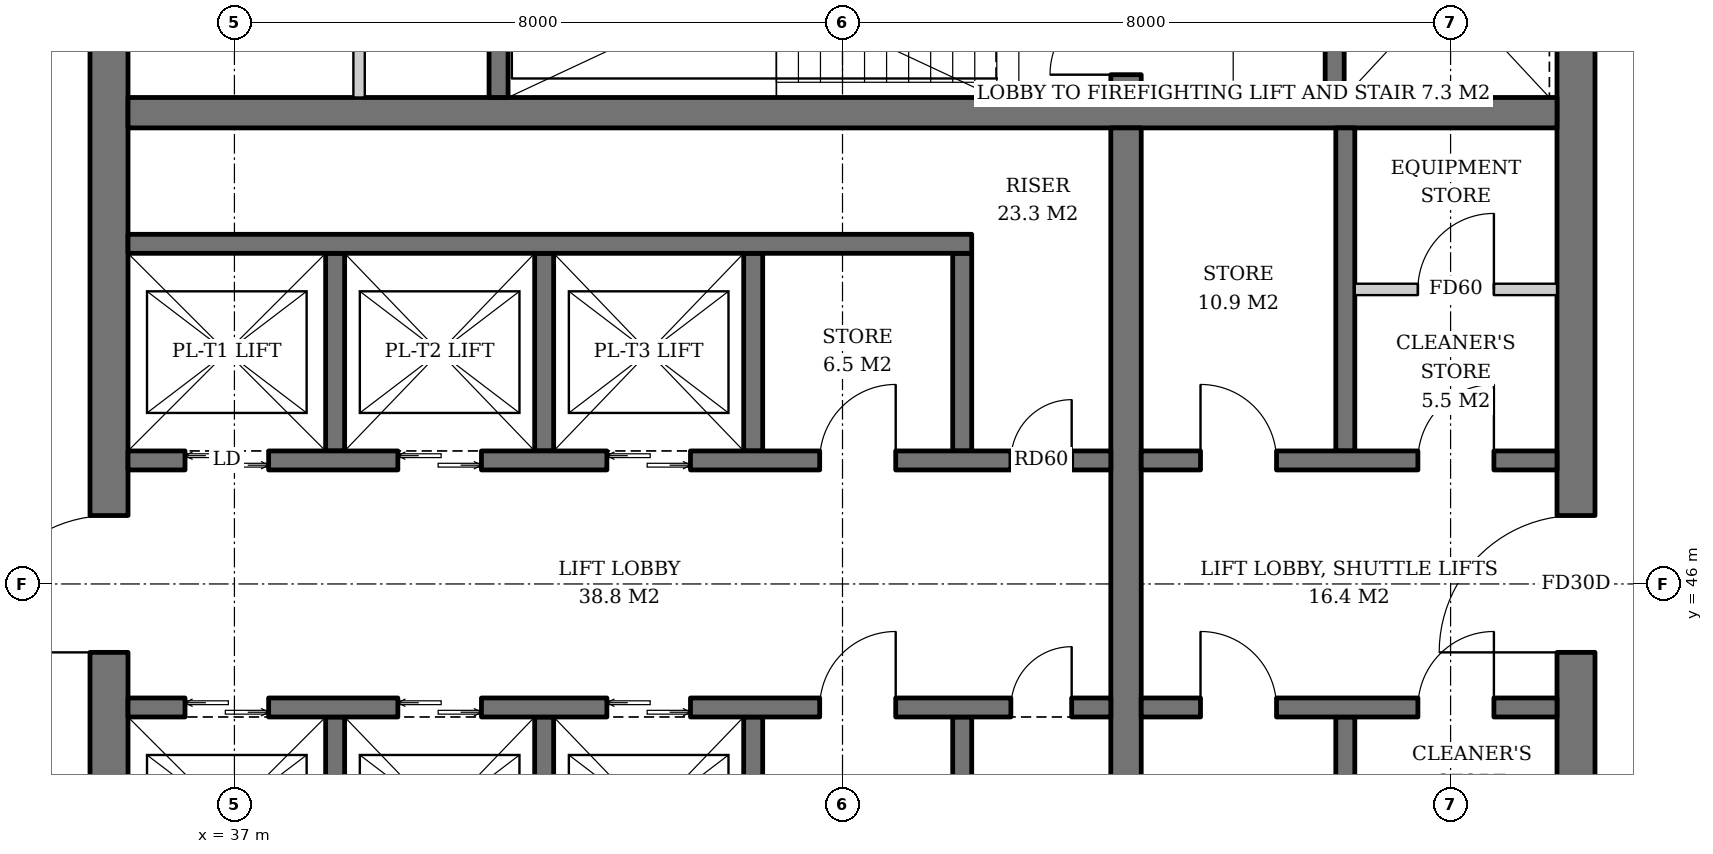
"""IFC4 building model, lengths in metres.
Left out: names, types, materials, properties, quantities, classifications, styles, units other than length and angle.
Written with IfcOpenShell. Run it as: python <this file> out.ifc"""

import sys

from ifc_helpers import new_model, si_unit, direction, frame, frame_2d, origin, place, context, subcontext, project, spatial, rectangle, extrude, element, fill, save


model = new_model("IFC4")
c1 = context("Model", 3, precision=1e-05, world=origin(), true_north=direction((0.0, 1.0)))
c2 = subcontext(c1, "Body", "Model", "MODEL_VIEW")
j1 = project(units=[si_unit("LENGTHUNIT", "METRE"), si_unit("PLANEANGLEUNIT", "RADIAN")], contexts=[c1])
p1 = place(None, origin())
s1 = spatial("IfcSite", under=j1, at=p1, CompositionType="ELEMENT")
p2 = place(p1, origin())
s2 = spatial("IfcBuilding", under=s1, at=p2, CompositionType="ELEMENT")
p3 = place(p2, frame((0.0, 0.0, 252.8)))
s3 = spatial("IfcBuildingStorey", under=s2, at=p3, CompositionType="ELEMENT", Elevation=252.8)
p4 = place(p3, frame((35.35, 36.6, 0.0), z_axis=(0.0, 0.0, 1.0), x_axis=(0.0, 1.0, 0.0)))
e1 = element("IfcWall", 1, at=p4, inside=s3, PredefinedType="SHEAR", context=c2, shape_type="SweptSolid", body=[
    extrude(rectangle(XDim=18.8, YDim=0.5, at=frame_2d((9.4, 0.0))), origin(), (0.0, 0.0, 1.0), 3.8),
])
p5 = place(p4, frame((8.5, 0.0, 0.0)))
e2 = element("IfcOpeningElement", 2, at=p5, cuts=e1, PredefinedType="OPENING", context=c2, shape_type="SweptSolid", body=[
    extrude(rectangle(XDim=1.8, YDim=2.4, at=frame_2d((0.9, 1.2))), frame((0.0, 0.26, 0.0), z_axis=(0.0, -1.0, 0.0), x_axis=(1.0, 0.0, 0.0)), (0.0, 0.0, 1.0), 0.52),
])
p6 = place(p3, frame((54.65, 36.6, 0.0), z_axis=(0.0, 0.0, 1.0), x_axis=(0.0, 1.0, 0.0)))
e3 = element("IfcWall", 3, at=p6, inside=s3, PredefinedType="SHEAR", context=c2, shape_type="SweptSolid", body=[
    extrude(rectangle(XDim=18.8, YDim=0.5, at=frame_2d((9.4, 0.0))), origin(), (0.0, 0.0, 1.0), 3.8),
])
p7 = place(p6, frame((8.5, 0.0, 0.0)))
e4 = element("IfcOpeningElement", 4, at=p7, cuts=e3, PredefinedType="OPENING", context=c2, shape_type="SweptSolid", body=[
    extrude(rectangle(XDim=1.8, YDim=2.4, at=frame_2d((0.9, 1.2))), frame((0.0, 0.26, 0.0), z_axis=(0.0, -1.0, 0.0), x_axis=(1.0, 0.0, 0.0)), (0.0, 0.0, 1.0), 0.52),
])
p8 = place(p3, frame((35.6, 52.2, 0.0), z_axis=(0.0, 0.0, 1.0), x_axis=(1.0, 0.0, 0.0)))
e5 = element("IfcWall", 5, at=p8, inside=s3, PredefinedType="SHEAR", context=c2, shape_type="SweptSolid", body=[
    extrude(rectangle(XDim=18.8, YDim=0.4, at=frame_2d((9.4, 0.0))), origin(), (0.0, 0.0, 1.0), 3.8),
])
p9 = place(p3, frame((48.73, 40.0, 0.0), z_axis=(0.0, 0.0, 1.0), x_axis=(0.0, 1.0, 0.0)))
e6 = element("IfcWall", 6, at=p9, inside=s3, PredefinedType="SHEAR", context=c2, shape_type="SweptSolid", body=[
    extrude(rectangle(XDim=12.0, YDim=0.4, at=frame_2d((6.0, 0.0))), origin(), (0.0, 0.0, 1.0), 3.8),
])
p10 = place(p3, frame((48.73, 52.4, 0.0), z_axis=(0.0, 0.0, 1.0), x_axis=(0.0, 1.0, 0.0)))
e7 = element("IfcWall", 7, at=p10, inside=s3, PredefinedType="SHEAR", context=c2, shape_type="SweptSolid", body=[
    extrude(rectangle(XDim=3.0, YDim=0.4, at=frame_2d((1.5, 0.0))), origin(), (0.0, 0.0, 1.0), 3.8),
])
p11 = place(p10, frame((0.3, 0.0, 0.0)))
e8 = element("IfcOpeningElement", 8, at=p11, cuts=e7, PredefinedType="OPENING", context=c2, shape_type="SweptSolid", body=[
    extrude(rectangle(XDim=1.0, YDim=2.1, at=frame_2d((0.5, 1.05))), frame((0.0, 0.21, 0.0), z_axis=(0.0, -1.0, 0.0), x_axis=(1.0, 0.0, 0.0)), (0.0, 0.0, 1.0), 0.42),
])
p12 = place(p3, frame((40.475, 52.4, 0.0), z_axis=(0.0, 0.0, 1.0), x_axis=(0.0, 1.0, 0.0)))
e9 = element("IfcWall", 9, at=p12, inside=s3, PredefinedType="SHEAR", context=c2, shape_type="SweptSolid", body=[
    extrude(rectangle(XDim=3.0, YDim=0.25, at=frame_2d((1.5, 0.0))), origin(), (0.0, 0.0, 1.0), 3.8),
])
p13 = place(p3, frame((51.475, 52.4, 0.0), z_axis=(0.0, 0.0, 1.0), x_axis=(0.0, 1.0, 0.0)))
e10 = element("IfcWall", 10, at=p13, inside=s3, PredefinedType="SHEAR", context=c2, shape_type="SweptSolid", body=[
    extrude(rectangle(XDim=3.0, YDim=0.25, at=frame_2d((1.5, 0.0))), origin(), (0.0, 0.0, 1.0), 3.8),
])
p14 = place(p13, frame((0.8, 0.0, 0.0)))
e11 = element("IfcOpeningElement", 11, at=p14, cuts=e10, PredefinedType="OPENING", context=c2, shape_type="SweptSolid", body=[
    extrude(rectangle(XDim=1.3, YDim=2.2, at=frame_2d((0.65, 1.1))), frame((0.0, 0.135, 0.0), z_axis=(0.0, -1.0, 0.0), x_axis=(1.0, 0.0, 0.0)), (0.0, 0.0, 1.0), 0.27),
])
for number, where, z_axis, x_axis in (
    (12, (38.325, 47.75, 0.0), (0.0, 0.0, 1.0), (0.0, 1.0, 0.0)),
    (13, (41.075, 47.75, 0.0), (0.0, 0.0, 1.0), (0.0, 1.0, 0.0)),
    (14, (43.825, 47.75, 0.0), (0.0, 0.0, 1.0), (0.0, 1.0, 0.0)),
    (15, (46.575, 47.75, 0.0), (0.0, 0.0, 1.0), (0.0, 1.0, 0.0)),
):
    element("IfcWall", number, at=place(p3, frame(where, z_axis=z_axis, x_axis=x_axis)), inside=s3, PredefinedType="SHEAR", context=c2, shape_type="SweptSolid", body=[
        extrude(rectangle(XDim=2.6, YDim=0.25, at=frame_2d((1.3, 0.0))), origin(), (0.0, 0.0, 1.0), 3.8),
    ])
p15 = place(p3, frame((35.6, 50.475, 0.0), z_axis=(0.0, 0.0, 1.0), x_axis=(1.0, 0.0, 0.0)))
e16 = element("IfcWall", 16, at=p15, inside=s3, PredefinedType="SHEAR", context=c2, shape_type="SweptSolid", body=[
    extrude(rectangle(XDim=11.1, YDim=0.25, at=frame_2d((5.55, 0.0))), origin(), (0.0, 0.0, 1.0), 3.8),
])
p16 = place(p3, frame((35.6, 47.625, 0.0), z_axis=(0.0, 0.0, 1.0), x_axis=(1.0, 0.0, 0.0)))
e17 = element("IfcWall", 17, at=p16, inside=s3, PredefinedType="SHEAR", context=c2, shape_type="SweptSolid", body=[
    extrude(rectangle(XDim=12.93, YDim=0.25, at=frame_2d((6.465, 0.0))), origin(), (0.0, 0.0, 1.0), 3.8),
])
p17 = place(p16, frame((0.75, 0.0, 0.0)))
e18 = element("IfcOpeningElement", 18, at=p17, cuts=e17, PredefinedType="OPENING", context=c2, shape_type="SweptSolid", body=[
    extrude(rectangle(XDim=1.1, YDim=2.2, at=frame_2d((0.55, 1.1))), frame((0.0, 0.135, 0.0), z_axis=(0.0, -1.0, 0.0), x_axis=(1.0, 0.0, 0.0)), (0.0, 0.0, 1.0), 0.27),
])
p18 = place(p16, frame((3.55, 0.0, 0.0)))
e19 = element("IfcOpeningElement", 19, at=p18, cuts=e17, PredefinedType="OPENING", context=c2, shape_type="SweptSolid", body=[
    extrude(rectangle(XDim=1.1, YDim=2.2, at=frame_2d((0.55, 1.1))), frame((0.0, 0.135, 0.0), z_axis=(0.0, -1.0, 0.0), x_axis=(1.0, 0.0, 0.0)), (0.0, 0.0, 1.0), 0.27),
])
p19 = place(p16, frame((6.3, 0.0, 0.0)))
e20 = element("IfcOpeningElement", 20, at=p19, cuts=e17, PredefinedType="OPENING", context=c2, shape_type="SweptSolid", body=[
    extrude(rectangle(XDim=1.1, YDim=2.2, at=frame_2d((0.55, 1.1))), frame((0.0, 0.135, 0.0), z_axis=(0.0, -1.0, 0.0), x_axis=(1.0, 0.0, 0.0)), (0.0, 0.0, 1.0), 0.27),
])
p20 = place(p16, frame((9.1, 0.0, 0.0)))
e21 = element("IfcOpeningElement", 21, at=p20, cuts=e17, PredefinedType="OPENING", context=c2, shape_type="SweptSolid", body=[
    extrude(rectangle(XDim=1.0, YDim=2.1, at=frame_2d((0.5, 1.05))), frame((0.0, 0.135, 0.0), z_axis=(0.0, -1.0, 0.0), x_axis=(1.0, 0.0, 0.0)), (0.0, 0.0, 1.0), 0.27),
])
p21 = place(p16, frame((11.615, 0.0, 0.0)))
e22 = element("IfcOpeningElement", 22, at=p21, cuts=e17, PredefinedType="OPENING", context=c2, shape_type="SweptSolid", body=[
    extrude(rectangle(XDim=0.8, YDim=2.0, at=frame_2d((0.4, 1.0))), frame((0.0, 0.135, 0.0), z_axis=(0.0, -1.0, 0.0), x_axis=(1.0, 0.0, 0.0)), (0.0, 0.0, 1.0), 0.27),
])
for number, where, z_axis, x_axis in (
    (23, (38.325, 44.25, 0.0), (0.0, 0.0, 1.0), (0.0, -1.0, 0.0)),
    (24, (41.075, 44.25, 0.0), (0.0, 0.0, 1.0), (0.0, -1.0, 0.0)),
    (25, (43.825, 44.25, 0.0), (0.0, 0.0, 1.0), (0.0, -1.0, 0.0)),
    (26, (46.575, 44.25, 0.0), (0.0, 0.0, 1.0), (0.0, -1.0, 0.0)),
):
    element("IfcWall", number, at=place(p3, frame(where, z_axis=z_axis, x_axis=x_axis)), inside=s3, PredefinedType="SHEAR", context=c2, shape_type="SweptSolid", body=[
        extrude(rectangle(XDim=2.6, YDim=0.25, at=frame_2d((1.3, 0.0))), origin(), (0.0, 0.0, 1.0), 3.8),
    ])
p22 = place(p3, frame((35.6, 44.375, 0.0), z_axis=(0.0, 0.0, 1.0), x_axis=(1.0, 0.0, 0.0)))
e27 = element("IfcWall", 27, at=p22, inside=s3, PredefinedType="SHEAR", context=c2, shape_type="SweptSolid", body=[
    extrude(rectangle(XDim=12.93, YDim=0.25, at=frame_2d((6.465, 0.0))), origin(), (0.0, 0.0, 1.0), 3.8),
])
p23 = place(p22, frame((0.75, 0.0, 0.0)))
e28 = element("IfcOpeningElement", 28, at=p23, cuts=e27, PredefinedType="OPENING", context=c2, shape_type="SweptSolid", body=[
    extrude(rectangle(XDim=1.1, YDim=2.2, at=frame_2d((0.55, 1.1))), frame((0.0, 0.135, 0.0), z_axis=(0.0, -1.0, 0.0), x_axis=(1.0, 0.0, 0.0)), (0.0, 0.0, 1.0), 0.27),
])
p24 = place(p22, frame((3.55, 0.0, 0.0)))
e29 = element("IfcOpeningElement", 29, at=p24, cuts=e27, PredefinedType="OPENING", context=c2, shape_type="SweptSolid", body=[
    extrude(rectangle(XDim=1.1, YDim=2.2, at=frame_2d((0.55, 1.1))), frame((0.0, 0.135, 0.0), z_axis=(0.0, -1.0, 0.0), x_axis=(1.0, 0.0, 0.0)), (0.0, 0.0, 1.0), 0.27),
])
p25 = place(p22, frame((6.3, 0.0, 0.0)))
e30 = element("IfcOpeningElement", 30, at=p25, cuts=e27, PredefinedType="OPENING", context=c2, shape_type="SweptSolid", body=[
    extrude(rectangle(XDim=1.1, YDim=2.2, at=frame_2d((0.55, 1.1))), frame((0.0, 0.135, 0.0), z_axis=(0.0, -1.0, 0.0), x_axis=(1.0, 0.0, 0.0)), (0.0, 0.0, 1.0), 0.27),
])
p26 = place(p22, frame((9.1, 0.0, 0.0)))
e31 = element("IfcOpeningElement", 31, at=p26, cuts=e27, PredefinedType="OPENING", context=c2, shape_type="SweptSolid", body=[
    extrude(rectangle(XDim=1.0, YDim=2.1, at=frame_2d((0.5, 1.05))), frame((0.0, 0.135, 0.0), z_axis=(0.0, -1.0, 0.0), x_axis=(1.0, 0.0, 0.0)), (0.0, 0.0, 1.0), 0.27),
])
p27 = place(p22, frame((11.615, 0.0, 0.0)))
e32 = element("IfcOpeningElement", 32, at=p27, cuts=e27, PredefinedType="OPENING", context=c2, shape_type="SweptSolid", body=[
    extrude(rectangle(XDim=0.8, YDim=2.0, at=frame_2d((0.4, 1.0))), frame((0.0, 0.135, 0.0), z_axis=(0.0, -1.0, 0.0), x_axis=(1.0, 0.0, 0.0)), (0.0, 0.0, 1.0), 0.27),
])
p28 = place(p3, frame((51.615, 47.75, 0.0), z_axis=(0.0, 0.0, 1.0), x_axis=(0.0, 1.0, 0.0)))
e33 = element("IfcWall", 33, at=p28, inside=s3, PredefinedType="SHEAR", context=c2, shape_type="SweptSolid", body=[
    extrude(rectangle(XDim=4.25, YDim=0.25, at=frame_2d((2.125, 0.0))), origin(), (0.0, 0.0, 1.0), 3.8),
])
p29 = place(p3, frame((48.93, 47.625, 0.0), z_axis=(0.0, 0.0, 1.0), x_axis=(1.0, 0.0, 0.0)))
e34 = element("IfcWall", 34, at=p29, inside=s3, PredefinedType="SHEAR", context=c2, shape_type="SweptSolid", body=[
    extrude(rectangle(XDim=5.47, YDim=0.25, at=frame_2d((2.735, 0.0))), origin(), (0.0, 0.0, 1.0), 3.8),
])
p30 = place(p29, frame((0.78, 0.0, 0.0)))
e35 = element("IfcOpeningElement", 35, at=p30, cuts=e34, PredefinedType="OPENING", context=c2, shape_type="SweptSolid", body=[
    extrude(rectangle(XDim=1.0, YDim=2.1, at=frame_2d((0.5, 1.05))), frame((0.0, 0.135, 0.0), z_axis=(0.0, -1.0, 0.0), x_axis=(1.0, 0.0, 0.0)), (0.0, 0.0, 1.0), 0.27),
])
p31 = place(p29, frame((3.64, 0.0, 0.0)))
e36 = element("IfcOpeningElement", 36, at=p31, cuts=e34, PredefinedType="OPENING", context=c2, shape_type="SweptSolid", body=[
    extrude(rectangle(XDim=1.0, YDim=2.1, at=frame_2d((0.5, 1.05))), frame((0.0, 0.135, 0.0), z_axis=(0.0, -1.0, 0.0), x_axis=(1.0, 0.0, 0.0)), (0.0, 0.0, 1.0), 0.27),
])
p32 = place(p3, frame((51.615, 44.25, 0.0), z_axis=(0.0, 0.0, 1.0), x_axis=(0.0, -1.0, 0.0)))
e37 = element("IfcWall", 37, at=p32, inside=s3, PredefinedType="SHEAR", context=c2, shape_type="SweptSolid", body=[
    extrude(rectangle(XDim=4.25, YDim=0.25, at=frame_2d((2.125, 0.0))), origin(), (0.0, 0.0, 1.0), 3.8),
])
p33 = place(p3, frame((48.93, 44.375, 0.0), z_axis=(0.0, 0.0, 1.0), x_axis=(1.0, 0.0, 0.0)))
e38 = element("IfcWall", 38, at=p33, inside=s3, PredefinedType="SHEAR", context=c2, shape_type="SweptSolid", body=[
    extrude(rectangle(XDim=5.47, YDim=0.25, at=frame_2d((2.735, 0.0))), origin(), (0.0, 0.0, 1.0), 3.8),
])
p34 = place(p33, frame((0.78, 0.0, 0.0)))
e39 = element("IfcOpeningElement", 39, at=p34, cuts=e38, PredefinedType="OPENING", context=c2, shape_type="SweptSolid", body=[
    extrude(rectangle(XDim=1.0, YDim=2.1, at=frame_2d((0.5, 1.05))), frame((0.0, 0.135, 0.0), z_axis=(0.0, -1.0, 0.0), x_axis=(1.0, 0.0, 0.0)), (0.0, 0.0, 1.0), 0.27),
])
p35 = place(p33, frame((3.64, 0.0, 0.0)))
e40 = element("IfcOpeningElement", 40, at=p35, cuts=e38, PredefinedType="OPENING", context=c2, shape_type="SweptSolid", body=[
    extrude(rectangle(XDim=1.0, YDim=2.1, at=frame_2d((0.5, 1.05))), frame((0.0, 0.135, 0.0), z_axis=(0.0, -1.0, 0.0), x_axis=(1.0, 0.0, 0.0)), (0.0, 0.0, 1.0), 0.27),
])
p36 = place(p3, frame((38.64, 52.4, 0.0), z_axis=(0.0, 0.0, 1.0), x_axis=(0.0, 1.0, 0.0)))
e41 = element("IfcWall", 41, at=p36, inside=s3, PredefinedType="SOLIDWALL", context=c2, shape_type="SweptSolid", body=[
    extrude(rectangle(XDim=3.0, YDim=0.15, at=frame_2d((1.5, 0.0))), origin(), (0.0, 0.0, 1.0), 3.62),
])
p37 = place(p3, frame((51.74, 49.875, 0.0), z_axis=(0.0, 0.0, 1.0), x_axis=(1.0, 0.0, 0.0)))
e42 = element("IfcWall", 42, at=p37, inside=s3, PredefinedType="SOLIDWALL", context=c2, shape_type="SweptSolid", body=[
    extrude(rectangle(XDim=2.66, YDim=0.15, at=frame_2d((1.33, 0.0))), origin(), (0.0, 0.0, 1.0), 3.62),
])
p38 = place(p37, frame((0.83, 0.0, 0.0)))
e43 = element("IfcOpeningElement", 43, at=p38, cuts=e42, PredefinedType="OPENING", context=c2, shape_type="SweptSolid", body=[
    extrude(rectangle(XDim=1.0, YDim=2.1, at=frame_2d((0.5, 1.05))), frame((0.0, 0.085, 0.0), z_axis=(0.0, -1.0, 0.0), x_axis=(1.0, 0.0, 0.0)), (0.0, 0.0, 1.0), 0.17),
])
p39 = place(p17, origin())
e44 = element("IfcDoor", 44, at=p39, inside=s3, OperationType="DOUBLE_DOOR_SLIDING", PredefinedType="DOOR", context=c2, shape_type="SweptSolid", body=[
    extrude(rectangle(XDim=1.1, YDim=2.2, at=frame_2d((0.55, 1.1))), frame((0.0, 0.025, 0.0), z_axis=(0.0, -1.0, 0.0), x_axis=(1.0, 0.0, 0.0)), (0.0, 0.0, 1.0), 0.05),
])
fill(e18, e44)
p40 = place(p18, origin())
e45 = element("IfcDoor", 45, at=p40, inside=s3, OperationType="DOUBLE_DOOR_SLIDING", PredefinedType="DOOR", context=c2, shape_type="SweptSolid", body=[
    extrude(rectangle(XDim=1.1, YDim=2.2, at=frame_2d((0.55, 1.1))), frame((0.0, 0.025, 0.0), z_axis=(0.0, -1.0, 0.0), x_axis=(1.0, 0.0, 0.0)), (0.0, 0.0, 1.0), 0.05),
])
fill(e19, e45)
p41 = place(p19, origin())
e46 = element("IfcDoor", 46, at=p41, inside=s3, OperationType="DOUBLE_DOOR_SLIDING", PredefinedType="DOOR", context=c2, shape_type="SweptSolid", body=[
    extrude(rectangle(XDim=1.1, YDim=2.2, at=frame_2d((0.55, 1.1))), frame((0.0, 0.025, 0.0), z_axis=(0.0, -1.0, 0.0), x_axis=(1.0, 0.0, 0.0)), (0.0, 0.0, 1.0), 0.05),
])
fill(e20, e46)
p42 = place(p20, origin())
e47 = element("IfcDoor", 47, at=p42, inside=s3, OperationType="SINGLE_SWING_RIGHT", PredefinedType="DOOR", context=c2, shape_type="SweptSolid", body=[
    extrude(rectangle(XDim=1.0, YDim=2.1, at=frame_2d((0.5, 1.05))), frame((0.0, 0.025, 0.0), z_axis=(0.0, -1.0, 0.0), x_axis=(1.0, 0.0, 0.0)), (0.0, 0.0, 1.0), 0.05),
])
fill(e21, e47)
p43 = place(p21, origin())
e48 = element("IfcDoor", 48, at=p43, inside=s3, OperationType="SINGLE_SWING_RIGHT", PredefinedType="DOOR", context=c2, shape_type="SweptSolid", body=[
    extrude(rectangle(XDim=0.8, YDim=2.0, at=frame_2d((0.4, 1.0))), frame((0.0, 0.025, 0.0), z_axis=(0.0, -1.0, 0.0), x_axis=(1.0, 0.0, 0.0)), (0.0, 0.0, 1.0), 0.05),
])
fill(e22, e48)
p44 = place(p23, origin())
e49 = element("IfcDoor", 49, at=p44, inside=s3, OperationType="DOUBLE_DOOR_SLIDING", PredefinedType="DOOR", context=c2, shape_type="SweptSolid", body=[
    extrude(rectangle(XDim=1.1, YDim=2.2, at=frame_2d((0.55, 1.1))), frame((0.0, 0.025, 0.0), z_axis=(0.0, -1.0, 0.0), x_axis=(1.0, 0.0, 0.0)), (0.0, 0.0, 1.0), 0.05),
])
fill(e28, e49)
p45 = place(p24, origin())
e50 = element("IfcDoor", 50, at=p45, inside=s3, OperationType="DOUBLE_DOOR_SLIDING", PredefinedType="DOOR", context=c2, shape_type="SweptSolid", body=[
    extrude(rectangle(XDim=1.1, YDim=2.2, at=frame_2d((0.55, 1.1))), frame((0.0, 0.025, 0.0), z_axis=(0.0, -1.0, 0.0), x_axis=(1.0, 0.0, 0.0)), (0.0, 0.0, 1.0), 0.05),
])
fill(e29, e50)
p46 = place(p25, origin())
e51 = element("IfcDoor", 51, at=p46, inside=s3, OperationType="DOUBLE_DOOR_SLIDING", PredefinedType="DOOR", context=c2, shape_type="SweptSolid", body=[
    extrude(rectangle(XDim=1.1, YDim=2.2, at=frame_2d((0.55, 1.1))), frame((0.0, 0.025, 0.0), z_axis=(0.0, -1.0, 0.0), x_axis=(1.0, 0.0, 0.0)), (0.0, 0.0, 1.0), 0.05),
])
fill(e30, e51)
p47 = place(p26, origin())
e52 = element("IfcDoor", 52, at=p47, inside=s3, OperationType="SINGLE_SWING_RIGHT", PredefinedType="DOOR", context=c2, shape_type="SweptSolid", body=[
    extrude(rectangle(XDim=1.0, YDim=2.1, at=frame_2d((0.5, 1.05))), frame((0.0, 0.025, 0.0), z_axis=(0.0, -1.0, 0.0), x_axis=(1.0, 0.0, 0.0)), (0.0, 0.0, 1.0), 0.05),
])
fill(e31, e52)
p48 = place(p27, origin())
e53 = element("IfcDoor", 53, at=p48, inside=s3, OperationType="SINGLE_SWING_RIGHT", PredefinedType="DOOR", context=c2, shape_type="SweptSolid", body=[
    extrude(rectangle(XDim=0.8, YDim=2.0, at=frame_2d((0.4, 1.0))), frame((0.0, 0.025, 0.0), z_axis=(0.0, -1.0, 0.0), x_axis=(1.0, 0.0, 0.0)), (0.0, 0.0, 1.0), 0.05),
])
fill(e32, e53)
p49 = place(p30, origin())
e54 = element("IfcDoor", 54, at=p49, inside=s3, OperationType="SINGLE_SWING_LEFT", PredefinedType="DOOR", context=c2, shape_type="SweptSolid", body=[
    extrude(rectangle(XDim=1.0, YDim=2.1, at=frame_2d((0.5, 1.05))), frame((0.0, 0.025, 0.0), z_axis=(0.0, -1.0, 0.0), x_axis=(1.0, 0.0, 0.0)), (0.0, 0.0, 1.0), 0.05),
])
fill(e35, e54)
p50 = place(p31, origin())
e55 = element("IfcDoor", 55, at=p50, inside=s3, OperationType="SINGLE_SWING_RIGHT", PredefinedType="DOOR", context=c2, shape_type="SweptSolid", body=[
    extrude(rectangle(XDim=1.0, YDim=2.1, at=frame_2d((0.5, 1.05))), frame((0.0, 0.025, 0.0), z_axis=(0.0, -1.0, 0.0), x_axis=(1.0, 0.0, 0.0)), (0.0, 0.0, 1.0), 0.05),
])
fill(e36, e55)
p51 = place(p34, origin())
e56 = element("IfcDoor", 56, at=p51, inside=s3, OperationType="SINGLE_SWING_LEFT", PredefinedType="DOOR", context=c2, shape_type="SweptSolid", body=[
    extrude(rectangle(XDim=1.0, YDim=2.1, at=frame_2d((0.5, 1.05))), frame((0.0, 0.025, 0.0), z_axis=(0.0, -1.0, 0.0), x_axis=(1.0, 0.0, 0.0)), (0.0, 0.0, 1.0), 0.05),
])
fill(e39, e56)
p52 = place(p35, origin())
e57 = element("IfcDoor", 57, at=p52, inside=s3, OperationType="SINGLE_SWING_RIGHT", PredefinedType="DOOR", context=c2, shape_type="SweptSolid", body=[
    extrude(rectangle(XDim=1.0, YDim=2.1, at=frame_2d((0.5, 1.05))), frame((0.0, 0.025, 0.0), z_axis=(0.0, -1.0, 0.0), x_axis=(1.0, 0.0, 0.0)), (0.0, 0.0, 1.0), 0.05),
])
fill(e40, e57)
p53 = place(p38, origin())
e58 = element("IfcDoor", 58, at=p53, inside=s3, OperationType="SINGLE_SWING_RIGHT", PredefinedType="DOOR", context=c2, shape_type="SweptSolid", body=[
    extrude(rectangle(XDim=1.0, YDim=2.1, at=frame_2d((0.5, 1.05))), frame((0.0, 0.025, 0.0), z_axis=(0.0, -1.0, 0.0), x_axis=(1.0, 0.0, 0.0)), (0.0, 0.0, 1.0), 0.05),
])
fill(e43, e58)
p54 = place(p11, origin())
e59 = element("IfcDoor", 59, at=p54, inside=s3, OperationType="SINGLE_SWING_LEFT", PredefinedType="DOOR", context=c2, shape_type="SweptSolid", body=[
    extrude(rectangle(XDim=1.0, YDim=2.1, at=frame_2d((0.5, 1.05))), frame((0.0, 0.025, 0.0), z_axis=(0.0, -1.0, 0.0), x_axis=(1.0, 0.0, 0.0)), (0.0, 0.0, 1.0), 0.05),
])
fill(e8, e59)
p55 = place(p5, origin())
e60 = element("IfcDoor", 60, at=p55, inside=s3, OperationType="DOUBLE_DOOR_SINGLE_SWING", PredefinedType="DOOR", context=c2, shape_type="SweptSolid", body=[
    extrude(rectangle(XDim=1.8, YDim=2.4, at=frame_2d((0.9, 1.2))), frame((0.0, 0.025, 0.0), z_axis=(0.0, -1.0, 0.0), x_axis=(1.0, 0.0, 0.0)), (0.0, 0.0, 1.0), 0.05),
])
fill(e2, e60)
p56 = place(p7, origin())
e61 = element("IfcDoor", 61, at=p56, inside=s3, OperationType="DOUBLE_DOOR_SINGLE_SWING", PredefinedType="DOOR", context=c2, shape_type="SweptSolid", body=[
    extrude(rectangle(XDim=1.8, YDim=2.4, at=frame_2d((0.9, 1.2))), frame((0.0, 0.025, 0.0), z_axis=(0.0, -1.0, 0.0), x_axis=(1.0, 0.0, 0.0)), (0.0, 0.0, 1.0), 0.05),
])
fill(e4, e61)
save(model, sys.argv[1])
